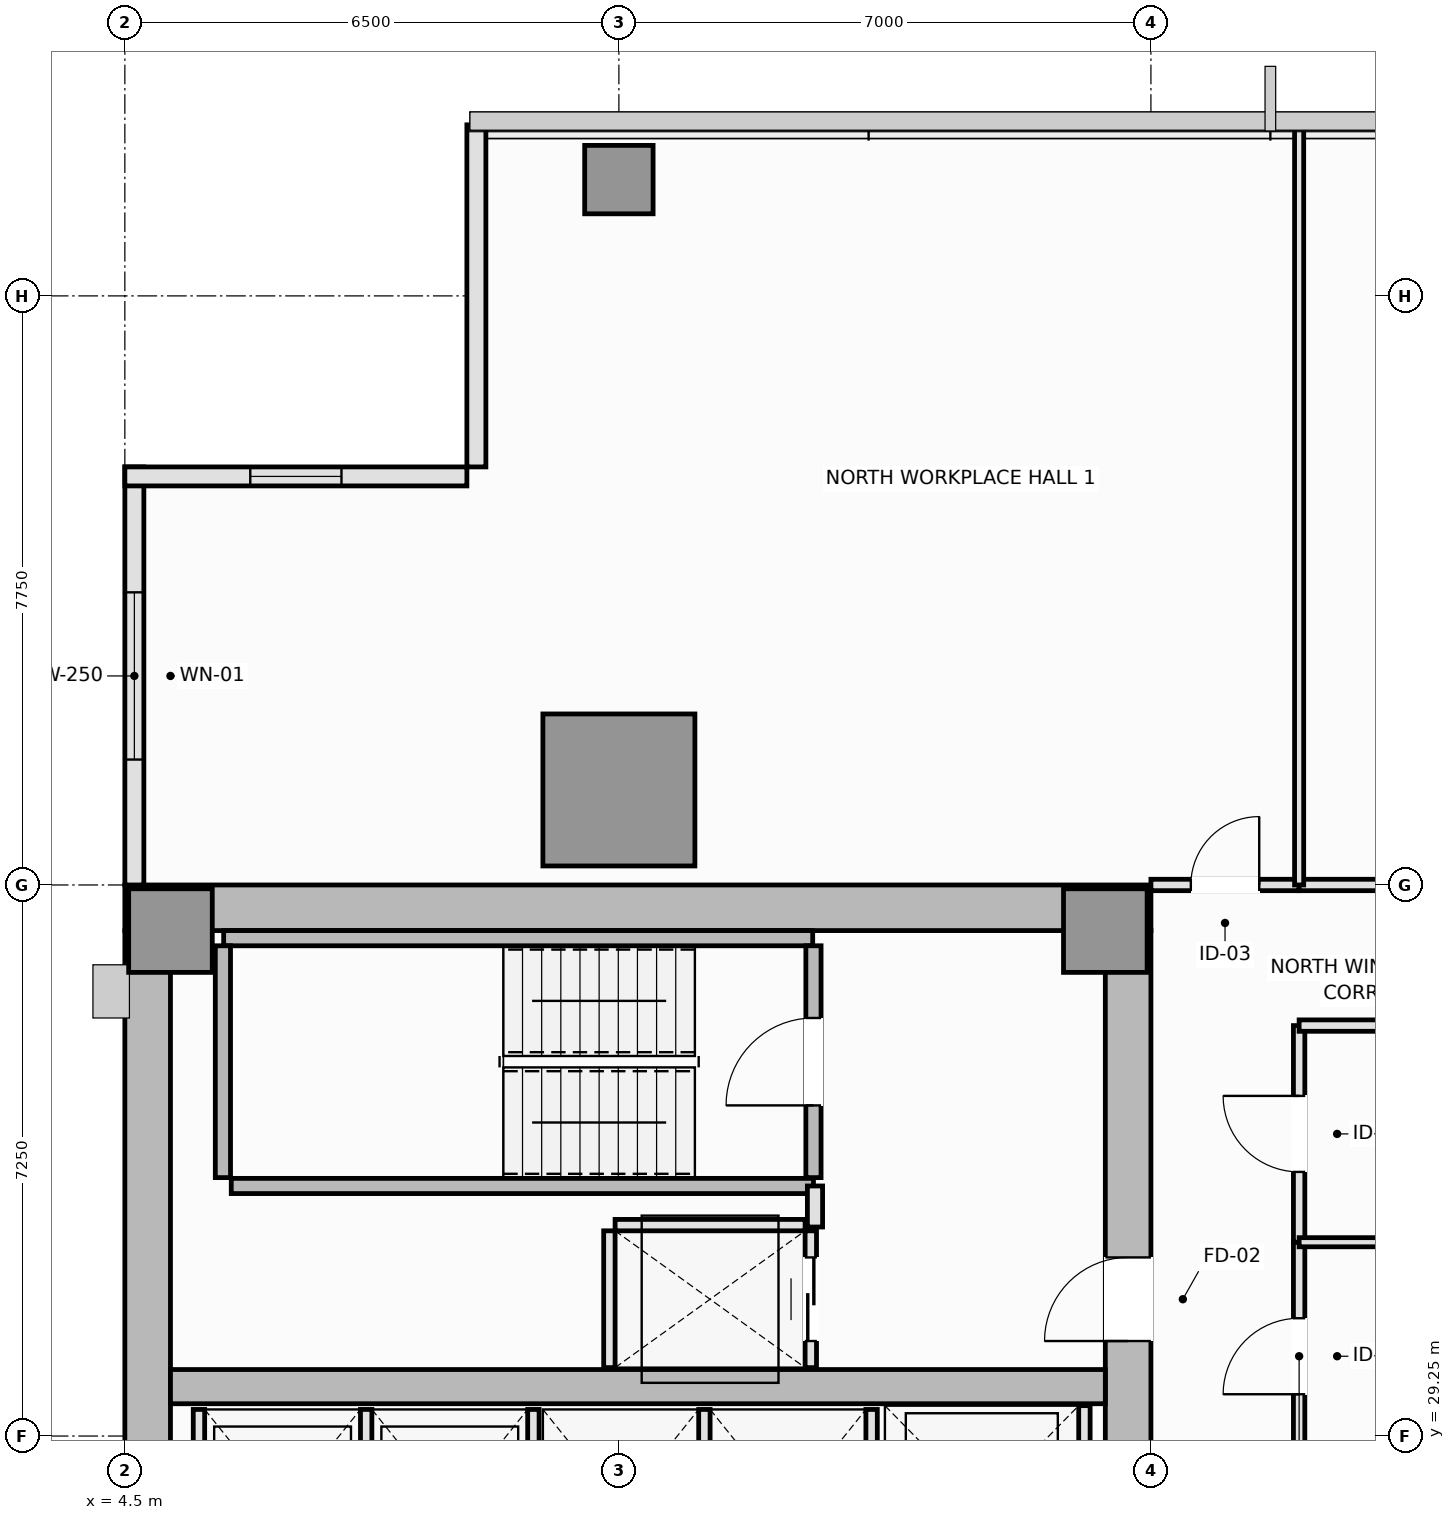
"""IFC4 building model, lengths in metres.
Left out: names, types, materials, properties, quantities, classifications, styles, units other than length and angle.
Written with IfcOpenShell. Run it as: python <this file> out.ifc"""

import sys

from ifc_helpers import new_model, si_unit, direction, frame, frame_2d, origin, origin_2d, place, context, subcontext, project, spatial, rectangle, extrude, element, fill, save


model = new_model("IFC4")
c1 = context("Model", 3, precision=1e-05, world=origin(), true_north=direction((0.0, 1.0)))
c2 = subcontext(c1, "Body", "Model", "MODEL_VIEW")
j1 = project(units=[si_unit("LENGTHUNIT", "METRE"), si_unit("PLANEANGLEUNIT", "RADIAN")], contexts=[c1])
p1 = place(None, origin())
s1 = spatial("IfcSite", under=j1, at=p1, CompositionType="ELEMENT")
p2 = place(p1, origin())
s2 = spatial("IfcBuilding", under=s1, at=p2, CompositionType="ELEMENT")
p3 = place(p2, frame((0.0, 0.0, 166.15)))
s3 = spatial("IfcBuildingStorey", under=s2, at=p3, CompositionType="ELEMENT", Elevation=166.15)
p4 = place(p3, frame((4.5, 36.2, 0.0), z_axis=(0.0, 0.0, 1.0), x_axis=(1.0, 0.0, 0.0)))
e1 = element("IfcWall", 1, at=p4, inside=s3, PredefinedType="SHEAR", context=c2, shape_type="SweptSolid", body=[
    extrude(rectangle(XDim=13.5, YDim=0.6, at=frame_2d((6.75, 0.0))), origin(), (0.0, 0.0, 1.0), 3.55),
])
p5 = place(p3, frame((4.8, 14.6, 0.0), z_axis=(0.0, 0.0, 1.0), x_axis=(0.0, 1.0, 0.0)))
e2 = element("IfcWall", 2, at=p5, inside=s3, PredefinedType="SHEAR", context=c2, shape_type="SweptSolid", body=[
    extrude(rectangle(XDim=21.3, YDim=0.6, at=frame_2d((10.65, 0.0))), origin(), (0.0, 0.0, 1.0), 3.55),
])
p6 = place(p3, frame((17.7, 27.05, 0.0), z_axis=(0.0, 0.0, 1.0), x_axis=(0.0, 1.0, 0.0)))
e3 = element("IfcWall", 3, at=p6, inside=s3, PredefinedType="SHEAR", context=c2, shape_type="SweptSolid", body=[
    extrude(rectangle(XDim=8.85, YDim=0.6, at=frame_2d((4.425, 0.0))), origin(), (0.0, 0.0, 1.0), 3.55),
])
p7 = place(p6, frame((3.45, 0.0, 0.0)))
e4 = element("IfcOpeningElement", 4, at=p7, cuts=e3, PredefinedType="OPENING", context=c2, shape_type="SweptSolid", body=[
    extrude(rectangle(XDim=1.1, YDim=2.15, at=frame_2d((0.55, 1.075))), frame((0.0, 0.31, 0.0), z_axis=(0.0, -1.0, 0.0), x_axis=(1.0, 0.0, 0.0)), (0.0, 0.0, 1.0), 0.62),
])
p8 = place(p3, frame((5.1, 29.9, 0.0), z_axis=(0.0, 0.0, 1.0), x_axis=(1.0, 0.0, 0.0)))
e5 = element("IfcWall", 5, at=p8, inside=s3, PredefinedType="SHEAR", context=c2, shape_type="SweptSolid", body=[
    extrude(rectangle(XDim=12.3, YDim=0.45, at=frame_2d((6.15, 0.0))), origin(), (0.0, 0.0, 1.0), 3.55),
])
for number, where, z_axis, x_axis in (
    (6, (5.1, 35.9, 0.0), (0.0, 0.0, 1.0), (1.0, 0.0, 0.0)),
    (7, (17.4, 35.9, 0.0), (0.0, 0.0, 1.0), (1.0, 0.0, 0.0)),
):
    element("IfcColumn", number, at=place(p3, frame(where, z_axis=z_axis, x_axis=x_axis)), inside=s3, PredefinedType="PILASTER", context=c2, shape_type="SweptSolid", body=[
        extrude(rectangle(XDim=1.1, YDim=1.1, at=origin_2d()), origin(), (0.0, 0.0, 1.0), 3.55),
    ])
p9 = place(p3, frame((11.0, 37.75, 0.0), z_axis=(0.0, 0.0, 1.0), x_axis=(1.0, 0.0, 0.0)))
e8 = element("IfcColumn", 8, at=p9, inside=s3, PredefinedType="COLUMN", context=c2, shape_type="SweptSolid", body=[
    extrude(rectangle(XDim=2.0, YDim=2.0, at=origin_2d()), origin(), (0.0, 0.0, 1.0), 3.55),
])
p10 = place(p3, frame((11.0, 45.78, 0.0), z_axis=(0.0, 0.0, 1.0), x_axis=(1.0, 0.0, 0.0)))
e9 = element("IfcColumn", 9, at=p10, inside=s3, PredefinedType="COLUMN", context=c2, shape_type="SweptSolid", body=[
    extrude(rectangle(XDim=0.9, YDim=0.9, at=origin_2d()), origin(), (0.0, 0.0, 1.0), 3.55),
])
p11 = place(p3, frame((4.625, 42.0, 0.0), z_axis=(0.0, 0.0, 1.0), x_axis=(0.0, -1.0, 0.0)))
e10 = element("IfcWall", 10, at=p11, inside=s3, PredefinedType="SOLIDWALL", context=c2, shape_type="SweptSolid", body=[
    extrude(rectangle(XDim=5.5, YDim=0.25, at=frame_2d((2.75, 0.0))), origin(), (0.0, 0.0, 1.0), 3.37),
])
p12 = place(p11, frame((1.65, 0.0, 0.9)))
e11 = element("IfcOpeningElement", 11, at=p12, cuts=e10, PredefinedType="OPENING", context=c2, shape_type="SweptSolid", body=[
    extrude(rectangle(XDim=2.2, YDim=1.8, at=frame_2d((1.1, 0.9))), frame((0.0, 0.135, 0.0), z_axis=(0.0, -1.0, 0.0), x_axis=(1.0, 0.0, 0.0)), (0.0, 0.0, 1.0), 0.27),
])
p13 = place(p3, frame((9.125, 46.5, 0.0), z_axis=(0.0, 0.0, 1.0), x_axis=(0.0, -1.0, 0.0)))
e12 = element("IfcWall", 12, at=p13, inside=s3, PredefinedType="SOLIDWALL", context=c2, shape_type="SweptSolid", body=[
    extrude(rectangle(XDim=4.5, YDim=0.25, at=frame_2d((2.25, 0.0))), origin(), (0.0, 0.0, 1.0), 3.37),
])
p14 = place(p3, frame((9.0, 41.875, 0.0), z_axis=(0.0, 0.0, 1.0), x_axis=(-1.0, 0.0, 0.0)))
e13 = element("IfcWall", 13, at=p14, inside=s3, PredefinedType="SOLIDWALL", context=c2, shape_type="SweptSolid", body=[
    extrude(rectangle(XDim=4.5, YDim=0.25, at=frame_2d((2.25, 0.0))), origin(), (0.0, 0.0, 1.0), 3.37),
])
p15 = place(p14, frame((1.65, 0.0, 0.9)))
e14 = element("IfcOpeningElement", 14, at=p15, cuts=e13, PredefinedType="OPENING", context=c2, shape_type="SweptSolid", body=[
    extrude(rectangle(XDim=1.2, YDim=1.8, at=frame_2d((0.6, 0.9))), frame((0.0, 0.135, 0.0), z_axis=(0.0, -1.0, 0.0), x_axis=(1.0, 0.0, 0.0)), (0.0, 0.0, 1.0), 0.27),
])
p16 = place(p3, frame((5.8, 35.8, 0.0), z_axis=(0.0, 0.0, 1.0), x_axis=(1.0, 0.0, 0.0)))
e15 = element("IfcWall", 15, at=p16, inside=s3, PredefinedType="SOLIDWALL", context=c2, shape_type="SweptSolid", body=[
    extrude(rectangle(XDim=7.75, YDim=0.2, at=frame_2d((3.875, 0.0))), origin(), (0.0, 0.0, 1.0), 3.55),
])
p17 = place(p3, frame((5.79, 32.65, 0.0), z_axis=(0.0, 0.0, 1.0), x_axis=(0.0, 1.0, 0.0)))
e16 = element("IfcWall", 16, at=p17, inside=s3, PredefinedType="SOLIDWALL", context=c2, shape_type="SweptSolid", body=[
    extrude(rectangle(XDim=3.05, YDim=0.2, at=frame_2d((1.525, 0.0))), origin(), (0.0, 0.0, 1.0), 3.55),
])
p18 = place(p3, frame((5.9, 32.54, 0.0), z_axis=(0.0, 0.0, 1.0), x_axis=(1.0, 0.0, 0.0)))
e17 = element("IfcWall", 17, at=p18, inside=s3, PredefinedType="SOLIDWALL", context=c2, shape_type="SweptSolid", body=[
    extrude(rectangle(XDim=7.66, YDim=0.2, at=frame_2d((3.83, 0.0))), origin(), (0.0, 0.0, 1.0), 3.55),
])
p19 = place(p3, frame((13.56, 32.65, 0.0), z_axis=(0.0, 0.0, 1.0), x_axis=(0.0, 1.0, 0.0)))
e18 = element("IfcWall", 18, at=p19, inside=s3, PredefinedType="SOLIDWALL", context=c2, shape_type="SweptSolid", body=[
    extrude(rectangle(XDim=3.05, YDim=0.2, at=frame_2d((1.525, 0.0))), origin(), (0.0, 0.0, 1.0), 3.55),
])
p20 = place(p19, frame((0.95, 0.0, 0.0)))
e19 = element("IfcOpeningElement", 19, at=p20, cuts=e18, PredefinedType="OPENING", context=c2, shape_type="SweptSolid", body=[
    extrude(rectangle(XDim=1.15, YDim=2.15, at=frame_2d((0.575, 1.075))), frame((0.0, 0.11, 0.0), z_axis=(0.0, -1.0, 0.0), x_axis=(1.0, 0.0, 0.0)), (0.0, 0.0, 1.0), 0.22),
])
for number, where, z_axis, x_axis in (
    (20, (5.475, 27.05, 0.0), (0.0, 0.0, 1.0), (0.0, 1.0, 0.0)),
    (21, (7.675, 27.05, 0.0), (0.0, 0.0, 1.0), (0.0, 1.0, 0.0)),
    (22, (9.875, 27.05, 0.0), (0.0, 0.0, 1.0), (0.0, 1.0, 0.0)),
    (23, (12.125, 27.05, 0.0), (0.0, 0.0, 1.0), (0.0, 1.0, 0.0)),
    (24, (14.325, 27.05, 0.0), (0.0, 0.0, 1.0), (0.0, 1.0, 0.0)),
):
    element("IfcWall", number, at=place(p3, frame(where, z_axis=z_axis, x_axis=x_axis)), inside=s3, PredefinedType="PARTITIONING", context=c2, shape_type="SweptSolid", body=[
        extrude(rectangle(XDim=2.55, YDim=0.15, at=frame_2d((1.275, 0.0))), origin(), (0.0, 0.0, 1.0), 3.37),
    ])
p21 = place(p3, frame((17.125, 27.05, 0.0), z_axis=(0.0, 0.0, 1.0), x_axis=(0.0, 1.0, 0.0)))
e25 = element("IfcWall", 25, at=p21, inside=s3, PredefinedType="PARTITIONING", context=c2, shape_type="SweptSolid", body=[
    extrude(rectangle(XDim=2.6, YDim=0.15, at=frame_2d((1.3, 0.0))), origin(), (0.0, 0.0, 1.0), 3.37),
])
p22 = place(p3, frame((10.95, 32.025, 0.0), z_axis=(0.0, 0.0, 1.0), x_axis=(1.0, 0.0, 0.0)))
e26 = element("IfcWall", 26, at=p22, inside=s3, PredefinedType="PARTITIONING", context=c2, shape_type="SweptSolid", body=[
    extrude(rectangle(XDim=2.5, YDim=0.15, at=frame_2d((1.25, 0.0))), origin(), (0.0, 0.0, 1.0), 3.37),
])
p23 = place(p3, frame((10.875, 30.15, 0.0), z_axis=(0.0, 0.0, 1.0), x_axis=(0.0, 1.0, 0.0)))
e27 = element("IfcWall", 27, at=p23, inside=s3, PredefinedType="PARTITIONING", context=c2, shape_type="SweptSolid", body=[
    extrude(rectangle(XDim=1.8, YDim=0.15, at=frame_2d((0.9, 0.0))), origin(), (0.0, 0.0, 1.0), 3.37),
])
p24 = place(p3, frame((13.525, 30.15, 0.0), z_axis=(0.0, 0.0, 1.0), x_axis=(0.0, 1.0, 0.0)))
e28 = element("IfcWall", 28, at=p24, inside=s3, PredefinedType="PARTITIONING", context=c2, shape_type="SweptSolid", body=[
    extrude(rectangle(XDim=1.8, YDim=0.15, at=frame_2d((0.9, 0.0))), origin(), (0.0, 0.0, 1.0), 3.37),
])
p25 = place(p24, frame((0.35, 0.0, 0.0)))
e29 = element("IfcOpeningElement", 29, at=p25, cuts=e28, PredefinedType="OPENING", context=c2, shape_type="SweptSolid", body=[
    extrude(rectangle(XDim=1.1, YDim=2.2, at=frame_2d((0.55, 1.1))), frame((0.0, 0.085, 0.0), z_axis=(0.0, -1.0, 0.0), x_axis=(1.0, 0.0, 0.0)), (0.0, 0.0, 1.0), 0.17),
])
p26 = place(p3, frame((13.58, 32.0, 0.0), z_axis=(0.0, 0.0, 1.0), x_axis=(0.0, 1.0, 0.0)))
e30 = element("IfcWall", 30, at=p26, inside=s3, PredefinedType="PARTITIONING", context=c2, shape_type="SweptSolid", body=[
    extrude(rectangle(XDim=0.54, YDim=0.2, at=frame_2d((0.27, 0.0))), origin(), (0.0, 0.0, 1.0), 3.37),
])
p27 = place(p3, frame((19.95, 28.8, 0.0), z_axis=(0.0, 0.0, 1.0), x_axis=(0.0, 1.0, 0.0)))
e31 = element("IfcWall", 31, at=p27, inside=s3, PredefinedType="PARTITIONING", context=c2, shape_type="SweptSolid", body=[
    extrude(rectangle(XDim=3.0, YDim=0.15, at=frame_2d((1.5, 0.0))), origin(), (0.0, 0.0, 1.0), 3.37),
])
p28 = place(p27, frame((1.0, 0.0, 0.0)))
e32 = element("IfcOpeningElement", 32, at=p28, cuts=e31, PredefinedType="OPENING", context=c2, shape_type="SweptSolid", body=[
    extrude(rectangle(XDim=1.0, YDim=2.15, at=frame_2d((0.5, 1.075))), frame((0.0, 0.085, 0.0), z_axis=(0.0, -1.0, 0.0), x_axis=(1.0, 0.0, 0.0)), (0.0, 0.0, 1.0), 0.17),
])
p29 = place(p3, frame((19.95, 31.8, 0.0), z_axis=(0.0, 0.0, 1.0), x_axis=(0.0, 1.0, 0.0)))
e33 = element("IfcWall", 33, at=p29, inside=s3, PredefinedType="PARTITIONING", context=c2, shape_type="SweptSolid", body=[
    extrude(rectangle(XDim=2.85, YDim=0.15, at=frame_2d((1.425, 0.0))), origin(), (0.0, 0.0, 1.0), 3.37),
])
p30 = place(p29, frame((0.925, 0.0, 0.0)))
e34 = element("IfcOpeningElement", 34, at=p30, cuts=e33, PredefinedType="OPENING", context=c2, shape_type="SweptSolid", body=[
    extrude(rectangle(XDim=1.0, YDim=2.15, at=frame_2d((0.5, 1.075))), frame((0.0, 0.085, 0.0), z_axis=(0.0, -1.0, 0.0), x_axis=(1.0, 0.0, 0.0)), (0.0, 0.0, 1.0), 0.17),
])
p31 = place(p3, frame((18.0, 36.5, 0.0), z_axis=(0.0, 0.0, 1.0), x_axis=(1.0, 0.0, 0.0)))
e35 = element("IfcWall", 35, at=p31, inside=s3, PredefinedType="PARTITIONING", context=c2, shape_type="SweptSolid", body=[
    extrude(rectangle(XDim=1.95, YDim=0.15, at=frame_2d((0.975, 0.0))), origin(), (0.0, 0.0, 1.0), 3.37),
])
p32 = place(p31, frame((0.525, 0.0, 0.0)))
e36 = element("IfcOpeningElement", 36, at=p32, cuts=e35, PredefinedType="OPENING", context=c2, shape_type="SweptSolid", body=[
    extrude(rectangle(XDim=0.9, YDim=2.1, at=frame_2d((0.45, 1.05))), frame((0.0, 0.085, 0.0), z_axis=(0.0, -1.0, 0.0), x_axis=(1.0, 0.0, 0.0)), (0.0, 0.0, 1.0), 0.17),
])
p33 = place(p3, frame((19.95, 34.65, 0.0), z_axis=(0.0, 0.0, 1.0), x_axis=(1.0, 0.0, 0.0)))
e37 = element("IfcWall", 37, at=p33, inside=s3, PredefinedType="PARTITIONING", context=c2, shape_type="SweptSolid", body=[
    extrude(rectangle(XDim=7.55, YDim=0.15, at=frame_2d((3.775, 0.0))), origin(), (0.0, 0.0, 1.0), 3.37),
])
p34 = place(p3, frame((19.95, 36.5, 0.0), z_axis=(0.0, 0.0, 1.0), x_axis=(1.0, 0.0, 0.0)))
e38 = element("IfcWall", 38, at=p34, inside=s3, PredefinedType="PARTITIONING", context=c2, shape_type="SweptSolid", body=[
    extrude(rectangle(XDim=7.55, YDim=0.15, at=frame_2d((3.775, 0.0))), origin(), (0.0, 0.0, 1.0), 3.37),
])
p35 = place(p34, frame((3.275, 0.0, 0.0)))
e39 = element("IfcOpeningElement", 39, at=p35, cuts=e38, PredefinedType="OPENING", context=c2, shape_type="SweptSolid", body=[
    extrude(rectangle(XDim=1.0, YDim=2.15, at=frame_2d((0.5, 1.075))), frame((0.0, 0.085, 0.0), z_axis=(0.0, -1.0, 0.0), x_axis=(1.0, 0.0, 0.0)), (0.0, 0.0, 1.0), 0.17),
])
p36 = place(p3, frame((19.95, 31.8, 0.0), z_axis=(0.0, 0.0, 1.0), x_axis=(1.0, 0.0, 0.0)))
e40 = element("IfcWall", 40, at=p36, inside=s3, PredefinedType="PARTITIONING", context=c2, shape_type="SweptSolid", body=[
    extrude(rectangle(XDim=7.55, YDim=0.12, at=frame_2d((3.775, 0.0))), origin(), (0.0, 0.0, 1.0), 3.37),
])
p37 = place(p3, frame((19.95, 36.5, 0.0), z_axis=(0.0, 0.0, 1.0), x_axis=(0.0, 1.0, 0.0)))
e41 = element("IfcWall", 41, at=p37, inside=s3, PredefinedType="PARTITIONING", context=c2, shape_type="SweptSolid", body=[
    extrude(rectangle(XDim=9.99, YDim=0.12, at=frame_2d((4.995, 0.0))), origin(), (0.0, 0.0, 1.0), 3.37),
])
p38 = place(p12, origin())
e42 = element("IfcWindow", 42, at=p38, inside=s3, PartitioningType="SINGLE_PANEL", PredefinedType="WINDOW", context=c2, shape_type="SweptSolid", body=[
    extrude(rectangle(XDim=2.2, YDim=1.8, at=frame_2d((1.1, 0.9))), frame((0.0, 0.03, 0.0), z_axis=(0.0, -1.0, 0.0), x_axis=(1.0, 0.0, 0.0)), (0.0, 0.0, 1.0), 0.06),
])
fill(e11, e42)
p39 = place(p15, origin())
e43 = element("IfcWindow", 43, at=p39, inside=s3, PartitioningType="SINGLE_PANEL", PredefinedType="WINDOW", context=c2, shape_type="SweptSolid", body=[
    extrude(rectangle(XDim=1.2, YDim=1.8, at=frame_2d((0.6, 0.9))), frame((0.0, 0.03, 0.0), z_axis=(0.0, -1.0, 0.0), x_axis=(1.0, 0.0, 0.0)), (0.0, 0.0, 1.0), 0.06),
])
fill(e14, e43)
p40 = place(p20, origin())
e44 = element("IfcDoor", 44, at=p40, inside=s3, OperationType="SINGLE_SWING_LEFT", PredefinedType="DOOR", context=c2, shape_type="SweptSolid", body=[
    extrude(rectangle(XDim=1.15, YDim=2.15, at=frame_2d((0.575, 1.075))), frame((0.0, 0.025, 0.0), z_axis=(0.0, -1.0, 0.0), x_axis=(1.0, 0.0, 0.0)), (0.0, 0.0, 1.0), 0.05),
])
fill(e19, e44)
p41 = place(p25, origin())
e45 = element("IfcDoor", 45, at=p41, inside=s3, OperationType="DOUBLE_DOOR_SLIDING", PredefinedType="DOOR", context=c2, shape_type="SweptSolid", body=[
    extrude(rectangle(XDim=1.1, YDim=2.2, at=frame_2d((0.55, 1.1))), frame((0.0, 0.025, 0.0), z_axis=(0.0, -1.0, 0.0), x_axis=(1.0, 0.0, 0.0)), (0.0, 0.0, 1.0), 0.05),
])
fill(e29, e45)
p42 = place(p7, origin())
e46 = element("IfcDoor", 46, at=p42, inside=s3, OperationType="SINGLE_SWING_LEFT", PredefinedType="DOOR", context=c2, shape_type="SweptSolid", body=[
    extrude(rectangle(XDim=1.1, YDim=2.15, at=frame_2d((0.55, 1.075))), frame((0.0, 0.025, 0.0), z_axis=(0.0, -1.0, 0.0), x_axis=(1.0, 0.0, 0.0)), (0.0, 0.0, 1.0), 0.05),
])
fill(e4, e46)
p43 = place(p28, origin())
e47 = element("IfcDoor", 47, at=p43, inside=s3, OperationType="SINGLE_SWING_LEFT", PredefinedType="DOOR", context=c2, shape_type="SweptSolid", body=[
    extrude(rectangle(XDim=1.0, YDim=2.15, at=frame_2d((0.5, 1.075))), frame((0.0, 0.025, 0.0), z_axis=(0.0, -1.0, 0.0), x_axis=(1.0, 0.0, 0.0)), (0.0, 0.0, 1.0), 0.05),
])
fill(e32, e47)
p44 = place(p30, origin())
e48 = element("IfcDoor", 48, at=p44, inside=s3, OperationType="SINGLE_SWING_RIGHT", PredefinedType="DOOR", context=c2, shape_type="SweptSolid", body=[
    extrude(rectangle(XDim=1.0, YDim=2.15, at=frame_2d((0.5, 1.075))), frame((0.0, 0.025, 0.0), z_axis=(0.0, -1.0, 0.0), x_axis=(1.0, 0.0, 0.0)), (0.0, 0.0, 1.0), 0.05),
])
fill(e34, e48)
p45 = place(p32, origin())
e49 = element("IfcDoor", 49, at=p45, inside=s3, OperationType="SINGLE_SWING_RIGHT", PredefinedType="DOOR", context=c2, shape_type="SweptSolid", body=[
    extrude(rectangle(XDim=0.9, YDim=2.1, at=frame_2d((0.45, 1.05))), frame((0.0, 0.025, 0.0), z_axis=(0.0, -1.0, 0.0), x_axis=(1.0, 0.0, 0.0)), (0.0, 0.0, 1.0), 0.05),
])
fill(e36, e49)
save(model, sys.argv[1])
